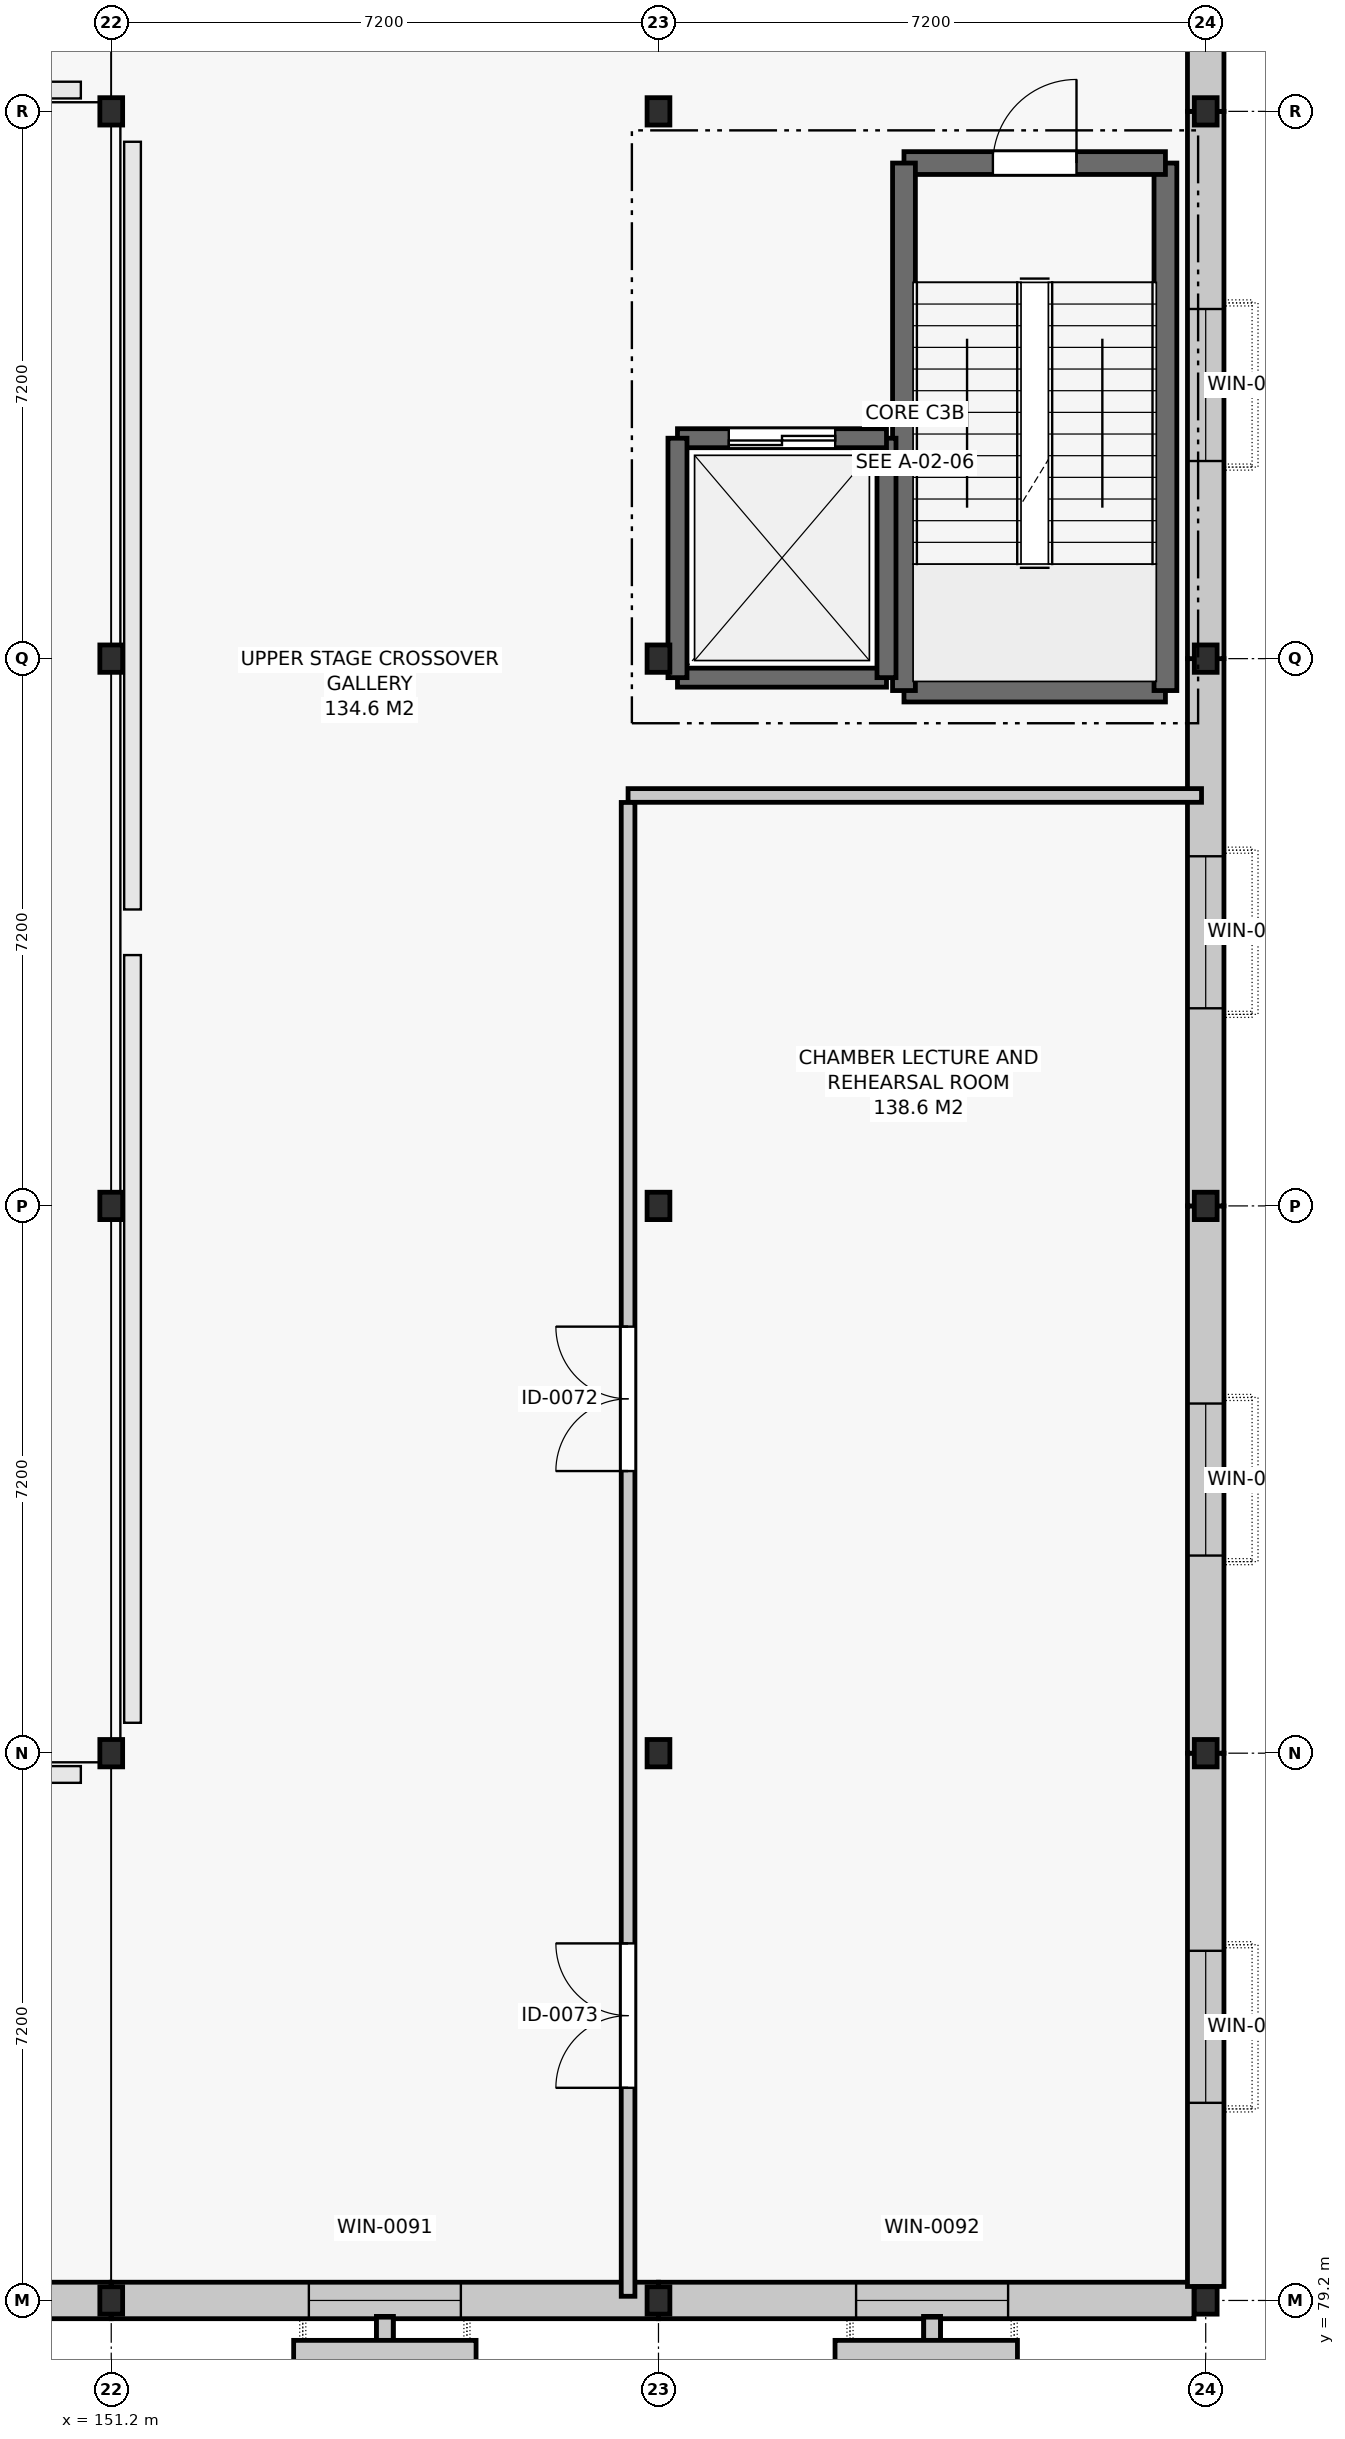
"""IFC4 building model, lengths in metres.
Left out: names, types, materials, properties, quantities, classifications, styles, units other than length and angle.
Written with IfcOpenShell. Run it as: python <this file> out.ifc"""

import sys

from ifc_helpers import new_model, si_unit, direction, frame, frame_2d, origin, origin_2d, place, context, subcontext, project, spatial, rectangle, i_section, extrude, element, fill, save


model = new_model("IFC4")
c1 = context("Model", 3, precision=1e-05, world=origin(), true_north=direction((0.0, 1.0)))
c2 = subcontext(c1, "Body", "Model", "MODEL_VIEW")
j1 = project(units=[si_unit("LENGTHUNIT", "METRE"), si_unit("PLANEANGLEUNIT", "RADIAN")], contexts=[c1])
p1 = place(None, origin())
s1 = spatial("IfcSite", under=j1, at=p1, CompositionType="ELEMENT")
p2 = place(p1, origin())
s2 = spatial("IfcBuilding", under=s1, at=p2, CompositionType="ELEMENT")
p3 = place(p2, frame((0.0, 0.0, 5.4)))
s3 = spatial("IfcBuildingStorey", under=s2, at=p3, CompositionType="ELEMENT", Elevation=5.4)
for number, where, z_axis, x_axis in (
    (1, (151.2, 79.2, 0.0), (0.0, 0.0, 1.0), (1.0, 0.0, 0.0)),
    (2, (151.2, 86.4, 0.0), (0.0, 0.0, 1.0), (1.0, 0.0, 0.0)),
    (3, (151.2, 93.6, 0.0), (0.0, 0.0, 1.0), (1.0, 0.0, 0.0)),
    (4, (151.2, 100.8, 0.0), (0.0, 0.0, 1.0), (1.0, 0.0, 0.0)),
    (5, (151.2, 108.0, 0.0), (0.0, 0.0, 1.0), (1.0, 0.0, 0.0)),
    (6, (158.4, 79.2, 0.0), (0.0, 0.0, 1.0), (1.0, 0.0, 0.0)),
    (7, (158.4, 86.4, 0.0), (0.0, 0.0, 1.0), (1.0, 0.0, 0.0)),
    (8, (158.4, 93.6, 0.0), (0.0, 0.0, 1.0), (1.0, 0.0, 0.0)),
    (9, (158.4, 100.8, 0.0), (0.0, 0.0, 1.0), (1.0, 0.0, 0.0)),
    (10, (158.4, 108.0, 0.0), (0.0, 0.0, 1.0), (1.0, 0.0, 0.0)),
    (11, (165.6, 79.2, 0.0), (0.0, 0.0, 1.0), (1.0, 0.0, 0.0)),
    (12, (165.6, 86.4, 0.0), (0.0, 0.0, 1.0), (1.0, 0.0, 0.0)),
    (13, (165.6, 93.6, 0.0), (0.0, 0.0, 1.0), (1.0, 0.0, 0.0)),
    (14, (165.6, 100.8, 0.0), (0.0, 0.0, 1.0), (1.0, 0.0, 0.0)),
    (15, (165.6, 108.0, 0.0), (0.0, 0.0, 1.0), (1.0, 0.0, 0.0)),
):
    element("IfcColumn", number, at=place(p3, frame(where, z_axis=z_axis, x_axis=x_axis)), inside=s3, PredefinedType="COLUMN", context=c2, shape_type="SweptSolid", body=[
        extrude(i_section(OverallWidth=0.3, OverallDepth=0.36, WebThickness=0.012, FlangeThickness=0.022, FilletRadius=0.027, at=origin_2d()), origin(), (0.0, 0.0, 1.0), 4.8),
    ])
p4 = place(p3, frame((144.0, 79.2, 0.0), z_axis=(0.0, 0.0, 1.0), x_axis=(1.0, 0.0, 0.0)))
e16 = element("IfcWall", 16, at=p4, inside=s3, PredefinedType="SOLIDWALL", context=c2, shape_type="SweptSolid", body=[
    extrude(rectangle(XDim=7.2, YDim=0.48, at=frame_2d((3.6, 0.0))), origin(), (0.0, 0.0, 1.0), 3.8),
])
p5 = place(p4, frame((2.6, 0.0, 1.35)))
e17 = element("IfcOpeningElement", 17, at=p5, cuts=e16, PredefinedType="OPENING", context=c2, shape_type="SweptSolid", body=[
    extrude(rectangle(XDim=2.0, YDim=1.5, at=frame_2d((1.0, 0.75))), frame((0.0, 0.252, 0.0), z_axis=(0.0, -1.0, 0.0), x_axis=(1.0, 0.0, 0.0)), (0.0, 0.0, 1.0), 0.504),
])
p6 = place(p3, frame((151.2, 79.2, 0.0), z_axis=(0.0, 0.0, 1.0), x_axis=(1.0, 0.0, 0.0)))
e18 = element("IfcWall", 18, at=p6, inside=s3, PredefinedType="SOLIDWALL", context=c2, shape_type="SweptSolid", body=[
    extrude(rectangle(XDim=7.2, YDim=0.48, at=frame_2d((3.6, 0.0))), origin(), (0.0, 0.0, 1.0), 3.8),
])
p7 = place(p6, frame((2.6, 0.0, 1.35)))
e19 = element("IfcOpeningElement", 19, at=p7, cuts=e18, PredefinedType="OPENING", context=c2, shape_type="SweptSolid", body=[
    extrude(rectangle(XDim=2.0, YDim=1.5, at=frame_2d((1.0, 0.75))), frame((0.0, 0.252, 0.0), z_axis=(0.0, -1.0, 0.0), x_axis=(1.0, 0.0, 0.0)), (0.0, 0.0, 1.0), 0.504),
])
p8 = place(p3, frame((158.4, 79.2, 0.0), z_axis=(0.0, 0.0, 1.0), x_axis=(1.0, 0.0, 0.0)))
e20 = element("IfcWall", 20, at=p8, inside=s3, PredefinedType="SOLIDWALL", context=c2, shape_type="SweptSolid", body=[
    extrude(rectangle(XDim=7.046, YDim=0.48, at=frame_2d((3.523, 0.0))), origin(), (0.0, 0.0, 1.0), 3.8),
])
p9 = place(p8, frame((2.6, 0.0, 1.35)))
e21 = element("IfcOpeningElement", 21, at=p9, cuts=e20, PredefinedType="OPENING", context=c2, shape_type="SweptSolid", body=[
    extrude(rectangle(XDim=2.0, YDim=1.5, at=frame_2d((1.0, 0.75))), frame((0.0, 0.252, 0.0), z_axis=(0.0, -1.0, 0.0), x_axis=(1.0, 0.0, 0.0)), (0.0, 0.0, 1.0), 0.504),
])
p10 = place(p3, frame((165.6, 79.384, 0.0), z_axis=(0.0, 0.0, 1.0), x_axis=(0.0, 1.0, 0.0)))
e22 = element("IfcWall", 22, at=p10, inside=s3, PredefinedType="SOLIDWALL", context=c2, shape_type="SweptSolid", body=[
    extrude(rectangle(XDim=7.016, YDim=0.48, at=frame_2d((3.508, 0.0))), origin(), (0.0, 0.0, 1.0), 3.8),
])
p11 = place(p10, frame((2.416, 0.0, 1.35)))
e23 = element("IfcOpeningElement", 23, at=p11, cuts=e22, PredefinedType="OPENING", context=c2, shape_type="SweptSolid", body=[
    extrude(rectangle(XDim=2.0, YDim=1.5, at=frame_2d((1.0, 0.75))), frame((0.0, 0.252, 0.0), z_axis=(0.0, -1.0, 0.0), x_axis=(1.0, 0.0, 0.0)), (0.0, 0.0, 1.0), 0.504),
])
p12 = place(p3, frame((165.6, 86.4, 0.0), z_axis=(0.0, 0.0, 1.0), x_axis=(0.0, 1.0, 0.0)))
e24 = element("IfcWall", 24, at=p12, inside=s3, PredefinedType="SOLIDWALL", context=c2, shape_type="SweptSolid", body=[
    extrude(rectangle(XDim=7.2, YDim=0.48, at=frame_2d((3.6, 0.0))), origin(), (0.0, 0.0, 1.0), 3.8),
])
p13 = place(p12, frame((2.6, 0.0, 1.35)))
e25 = element("IfcOpeningElement", 25, at=p13, cuts=e24, PredefinedType="OPENING", context=c2, shape_type="SweptSolid", body=[
    extrude(rectangle(XDim=2.0, YDim=1.5, at=frame_2d((1.0, 0.75))), frame((0.0, 0.252, 0.0), z_axis=(0.0, -1.0, 0.0), x_axis=(1.0, 0.0, 0.0)), (0.0, 0.0, 1.0), 0.504),
])
p14 = place(p3, frame((165.6, 93.6, 0.0), z_axis=(0.0, 0.0, 1.0), x_axis=(0.0, 1.0, 0.0)))
e26 = element("IfcWall", 26, at=p14, inside=s3, PredefinedType="SOLIDWALL", context=c2, shape_type="SweptSolid", body=[
    extrude(rectangle(XDim=7.2, YDim=0.48, at=frame_2d((3.6, 0.0))), origin(), (0.0, 0.0, 1.0), 3.8),
])
p15 = place(p14, frame((2.6, 0.0, 1.35)))
e27 = element("IfcOpeningElement", 27, at=p15, cuts=e26, PredefinedType="OPENING", context=c2, shape_type="SweptSolid", body=[
    extrude(rectangle(XDim=2.0, YDim=1.5, at=frame_2d((1.0, 0.75))), frame((0.0, 0.252, 0.0), z_axis=(0.0, -1.0, 0.0), x_axis=(1.0, 0.0, 0.0)), (0.0, 0.0, 1.0), 0.504),
])
p16 = place(p3, frame((165.6, 100.8, 0.0), z_axis=(0.0, 0.0, 1.0), x_axis=(0.0, 1.0, 0.0)))
e28 = element("IfcWall", 28, at=p16, inside=s3, PredefinedType="SOLIDWALL", context=c2, shape_type="SweptSolid", body=[
    extrude(rectangle(XDim=7.2, YDim=0.48, at=frame_2d((3.6, 0.0))), origin(), (0.0, 0.0, 1.0), 3.8),
])
p17 = place(p16, frame((2.6, 0.0, 1.35)))
e29 = element("IfcOpeningElement", 29, at=p17, cuts=e28, PredefinedType="OPENING", context=c2, shape_type="SweptSolid", body=[
    extrude(rectangle(XDim=2.0, YDim=1.5, at=frame_2d((1.0, 0.75))), frame((0.0, 0.252, 0.0), z_axis=(0.0, -1.0, 0.0), x_axis=(1.0, 0.0, 0.0)), (0.0, 0.0, 1.0), 0.504),
])
p18 = place(p3, frame((165.6, 108.0, 0.0), z_axis=(0.0, 0.0, 1.0), x_axis=(0.0, 1.0, 0.0)))
e30 = element("IfcWall", 30, at=p18, inside=s3, PredefinedType="SOLIDWALL", context=c2, shape_type="SweptSolid", body=[
    extrude(rectangle(XDim=7.016, YDim=0.48, at=frame_2d((3.508, 0.0))), origin(), (0.0, 0.0, 1.0), 3.8),
])
p19 = place(p18, frame((2.6, 0.0, 1.35)))
e31 = element("IfcOpeningElement", 31, at=p19, cuts=e30, PredefinedType="OPENING", context=c2, shape_type="SweptSolid", body=[
    extrude(rectangle(XDim=2.0, YDim=1.5, at=frame_2d((1.0, 0.75))), frame((0.0, 0.252, 0.0), z_axis=(0.0, -1.0, 0.0), x_axis=(1.0, 0.0, 0.0)), (0.0, 0.0, 1.0), 0.504),
])
p20 = place(p3, frame((161.63, 100.38, 0.0), z_axis=(0.0, 0.0, 1.0), x_axis=(1.0, 0.0, 0.0)))
e32 = element("IfcWall", 32, at=p20, inside=s3, PredefinedType="SHEAR", context=c2, shape_type="SweptSolid", body=[
    extrude(rectangle(XDim=3.44, YDim=0.3, at=frame_2d((1.72, 0.0))), origin(), (0.0, 0.0, 1.0), 4.52),
])
p21 = place(p3, frame((165.07, 100.38, 0.0), z_axis=(0.0, 0.0, 1.0), x_axis=(0.0, 1.0, 0.0)))
e33 = element("IfcWall", 33, at=p21, inside=s3, PredefinedType="SHEAR", context=c2, shape_type="SweptSolid", body=[
    extrude(rectangle(XDim=6.94, YDim=0.3, at=frame_2d((3.47, 0.0))), origin(), (0.0, 0.0, 1.0), 4.52),
])
p22 = place(p3, frame((165.07, 107.32, 0.0), z_axis=(0.0, 0.0, 1.0), x_axis=(-1.0, 0.0, 0.0)))
e34 = element("IfcWall", 34, at=p22, inside=s3, PredefinedType="SHEAR", context=c2, shape_type="SweptSolid", body=[
    extrude(rectangle(XDim=3.44, YDim=0.3, at=frame_2d((1.72, 0.0))), origin(), (0.0, 0.0, 1.0), 4.52),
])
p23 = place(p22, frame((1.17, 0.0, 0.0)))
e35 = element("IfcOpeningElement", 35, at=p23, cuts=e34, PredefinedType="OPENING", context=c2, shape_type="SweptSolid", body=[
    extrude(rectangle(XDim=1.1, YDim=2.15, at=frame_2d((0.55, 1.075))), frame((0.0, 0.162, 0.0), z_axis=(0.0, -1.0, 0.0), x_axis=(1.0, 0.0, 0.0)), (0.0, 0.0, 1.0), 0.324),
])
p24 = place(p3, frame((161.63, 107.32, 0.0), z_axis=(0.0, 0.0, 1.0), x_axis=(0.0, -1.0, 0.0)))
e36 = element("IfcWall", 36, at=p24, inside=s3, PredefinedType="SHEAR", context=c2, shape_type="SweptSolid", body=[
    extrude(rectangle(XDim=6.94, YDim=0.3, at=frame_2d((3.47, 0.0))), origin(), (0.0, 0.0, 1.0), 4.52),
])
p25 = place(p3, frame((158.65, 100.55, 0.0), z_axis=(0.0, 0.0, 1.0), x_axis=(1.0, 0.0, 0.0)))
e37 = element("IfcWall", 37, at=p25, inside=s3, PredefinedType="SHEAR", context=c2, shape_type="SweptSolid", body=[
    extrude(rectangle(XDim=2.75, YDim=0.25, at=frame_2d((1.375, 0.0))), origin(), (0.0, 0.0, 1.0), 4.52),
])
p26 = place(p3, frame((161.4, 100.55, 0.0), z_axis=(0.0, 0.0, 1.0), x_axis=(0.0, 1.0, 0.0)))
e38 = element("IfcWall", 38, at=p26, inside=s3, PredefinedType="SHEAR", context=c2, shape_type="SweptSolid", body=[
    extrude(rectangle(XDim=3.15, YDim=0.25, at=frame_2d((1.575, 0.0))), origin(), (0.0, 0.0, 1.0), 4.52),
])
p27 = place(p3, frame((161.4, 103.7, 0.0), z_axis=(0.0, 0.0, 1.0), x_axis=(-1.0, 0.0, 0.0)))
e39 = element("IfcWall", 39, at=p27, inside=s3, PredefinedType="SHEAR", context=c2, shape_type="SweptSolid", body=[
    extrude(rectangle(XDim=2.75, YDim=0.25, at=frame_2d((1.375, 0.0))), origin(), (0.0, 0.0, 1.0), 4.52),
])
p28 = place(p27, frame((0.675, 0.0, 0.0)))
e40 = element("IfcOpeningElement", 40, at=p28, cuts=e39, PredefinedType="OPENING", context=c2, shape_type="SweptSolid", body=[
    extrude(rectangle(XDim=1.4, YDim=2.2, at=frame_2d((0.7, 1.1))), frame((0.0, 0.137, 0.0), z_axis=(0.0, -1.0, 0.0), x_axis=(1.0, 0.0, 0.0)), (0.0, 0.0, 1.0), 0.274),
])
p29 = place(p3, frame((158.65, 103.7, 0.0), z_axis=(0.0, 0.0, 1.0), x_axis=(0.0, -1.0, 0.0)))
e41 = element("IfcWall", 41, at=p29, inside=s3, PredefinedType="SHEAR", context=c2, shape_type="SweptSolid", body=[
    extrude(rectangle(XDim=3.15, YDim=0.25, at=frame_2d((1.575, 0.0))), origin(), (0.0, 0.0, 1.0), 4.52),
])
p30 = place(p3, frame((158.0, 99.0, 0.0), z_axis=(0.0, 0.0, 1.0), x_axis=(1.0, 0.0, 0.0)))
e42 = element("IfcWall", 42, at=p30, inside=s3, PredefinedType="PARTITIONING", context=c2, shape_type="SweptSolid", body=[
    extrude(rectangle(XDim=7.545, YDim=0.18, at=frame_2d((3.772, 0.0))), origin(), (0.0, 0.0, 1.0), 3.805),
])
p31 = place(p3, frame((158.0, 79.255, 0.0), z_axis=(0.0, 0.0, 1.0), x_axis=(0.0, 1.0, 0.0)))
e43 = element("IfcWall", 43, at=p31, inside=s3, PredefinedType="PARTITIONING", context=c2, shape_type="SweptSolid", body=[
    extrude(rectangle(XDim=19.653, YDim=0.18, at=frame_2d((9.827, 0.0))), origin(), (0.0, 0.0, 1.0), 3.955),
])
p32 = place(p31, frame((10.857, 0.0, 0.0)))
e44 = element("IfcOpeningElement", 44, at=p32, cuts=e43, PredefinedType="OPENING", context=c2, shape_type="SweptSolid", body=[
    extrude(rectangle(XDim=1.9, YDim=2.35, at=frame_2d((0.95, 1.175))), frame((0.0, 0.102, 0.0), z_axis=(0.0, -1.0, 0.0), x_axis=(1.0, 0.0, 0.0)), (0.0, 0.0, 1.0), 0.204),
])
p33 = place(p31, frame((2.742, 0.0, 0.0)))
e45 = element("IfcOpeningElement", 45, at=p33, cuts=e43, PredefinedType="OPENING", context=c2, shape_type="SweptSolid", body=[
    extrude(rectangle(XDim=1.9, YDim=2.35, at=frame_2d((0.95, 1.175))), frame((0.0, 0.102, 0.0), z_axis=(0.0, -1.0, 0.0), x_axis=(1.0, 0.0, 0.0)), (0.0, 0.0, 1.0), 0.204),
])
p34 = place(p7, origin())
e46 = element("IfcWindow", 46, at=p34, inside=s3, PartitioningType="SINGLE_PANEL", PredefinedType="WINDOW", context=c2, shape_type="SweptSolid", body=[
    extrude(rectangle(XDim=2.0, YDim=1.5, at=frame_2d((1.0, 0.75))), frame((0.0, 0.03, 0.0), z_axis=(0.0, -1.0, 0.0), x_axis=(1.0, 0.0, 0.0)), (0.0, 0.0, 1.0), 0.06),
])
fill(e19, e46)
p35 = place(p9, origin())
e47 = element("IfcWindow", 47, at=p35, inside=s3, PartitioningType="SINGLE_PANEL", PredefinedType="WINDOW", context=c2, shape_type="SweptSolid", body=[
    extrude(rectangle(XDim=2.0, YDim=1.5, at=frame_2d((1.0, 0.75))), frame((0.0, 0.03, 0.0), z_axis=(0.0, -1.0, 0.0), x_axis=(1.0, 0.0, 0.0)), (0.0, 0.0, 1.0), 0.06),
])
fill(e21, e47)
p36 = place(p11, origin())
e48 = element("IfcWindow", 48, at=p36, inside=s3, PartitioningType="SINGLE_PANEL", PredefinedType="WINDOW", context=c2, shape_type="SweptSolid", body=[
    extrude(rectangle(XDim=2.0, YDim=1.5, at=frame_2d((1.0, 0.75))), frame((0.0, 0.03, 0.0), z_axis=(0.0, -1.0, 0.0), x_axis=(1.0, 0.0, 0.0)), (0.0, 0.0, 1.0), 0.06),
])
fill(e23, e48)
p37 = place(p13, origin())
e49 = element("IfcWindow", 49, at=p37, inside=s3, PartitioningType="SINGLE_PANEL", PredefinedType="WINDOW", context=c2, shape_type="SweptSolid", body=[
    extrude(rectangle(XDim=2.0, YDim=1.5, at=frame_2d((1.0, 0.75))), frame((0.0, 0.03, 0.0), z_axis=(0.0, -1.0, 0.0), x_axis=(1.0, 0.0, 0.0)), (0.0, 0.0, 1.0), 0.06),
])
fill(e25, e49)
p38 = place(p15, origin())
e50 = element("IfcWindow", 50, at=p38, inside=s3, PartitioningType="SINGLE_PANEL", PredefinedType="WINDOW", context=c2, shape_type="SweptSolid", body=[
    extrude(rectangle(XDim=2.0, YDim=1.5, at=frame_2d((1.0, 0.75))), frame((0.0, 0.03, 0.0), z_axis=(0.0, -1.0, 0.0), x_axis=(1.0, 0.0, 0.0)), (0.0, 0.0, 1.0), 0.06),
])
fill(e27, e50)
p39 = place(p17, origin())
e51 = element("IfcWindow", 51, at=p39, inside=s3, PartitioningType="SINGLE_PANEL", PredefinedType="WINDOW", context=c2, shape_type="SweptSolid", body=[
    extrude(rectangle(XDim=2.0, YDim=1.5, at=frame_2d((1.0, 0.75))), frame((0.0, 0.03, 0.0), z_axis=(0.0, -1.0, 0.0), x_axis=(1.0, 0.0, 0.0)), (0.0, 0.0, 1.0), 0.06),
])
fill(e29, e51)
p40 = place(p23, frame((1.1, 0.0, 0.0), z_axis=(0.0, 0.0, 1.0), x_axis=(-1.0, 0.0, 0.0)))
e52 = element("IfcDoor", 52, at=p40, inside=s3, OperationType="SINGLE_SWING_RIGHT", PredefinedType="DOOR", context=c2, shape_type="SweptSolid", body=[
    extrude(rectangle(XDim=1.1, YDim=2.15, at=frame_2d((0.55, 1.075))), frame((0.0, 0.025, 0.0), z_axis=(0.0, -1.0, 0.0), x_axis=(1.0, 0.0, 0.0)), (0.0, 0.0, 1.0), 0.05),
])
fill(e35, e52)
p41 = place(p28, origin())
e53 = element("IfcDoor", 53, at=p41, inside=s3, OperationType="DOUBLE_DOOR_SLIDING", PredefinedType="DOOR", context=c2, shape_type="SweptSolid", body=[
    extrude(rectangle(XDim=1.4, YDim=2.2, at=frame_2d((0.7, 1.1))), frame((0.0, 0.025, 0.0), z_axis=(0.0, -1.0, 0.0), x_axis=(1.0, 0.0, 0.0)), (0.0, 0.0, 1.0), 0.05),
])
fill(e40, e53)
p42 = place(p32, origin())
e54 = element("IfcDoor", 54, at=p42, inside=s3, OperationType="DOUBLE_DOOR_SINGLE_SWING", PredefinedType="DOOR", context=c2, shape_type="SweptSolid", body=[
    extrude(rectangle(XDim=1.9, YDim=2.35, at=frame_2d((0.95, 1.175))), frame((0.0, 0.025, 0.0), z_axis=(0.0, -1.0, 0.0), x_axis=(1.0, 0.0, 0.0)), (0.0, 0.0, 1.0), 0.05),
])
fill(e44, e54)
p43 = place(p33, origin())
e55 = element("IfcDoor", 55, at=p43, inside=s3, OperationType="DOUBLE_DOOR_SINGLE_SWING", PredefinedType="DOOR", context=c2, shape_type="SweptSolid", body=[
    extrude(rectangle(XDim=1.9, YDim=2.35, at=frame_2d((0.95, 1.175))), frame((0.0, 0.025, 0.0), z_axis=(0.0, -1.0, 0.0), x_axis=(1.0, 0.0, 0.0)), (0.0, 0.0, 1.0), 0.05),
])
fill(e45, e55)
save(model, sys.argv[1])
